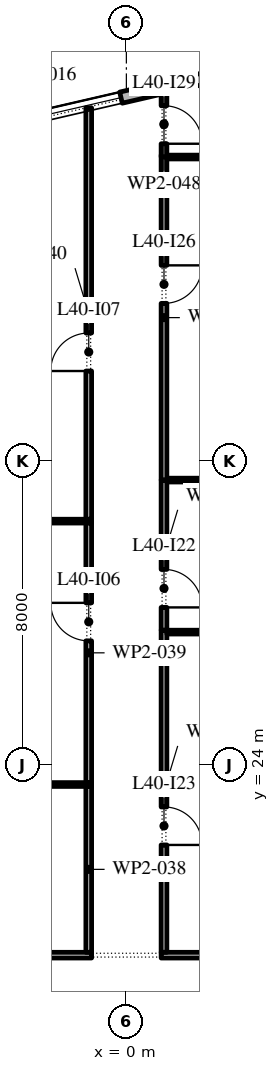
"""IFC4 building model, lengths in metres.
Left out: names, types, materials, properties, quantities, classifications, styles, units other than length and angle.
Written with IfcOpenShell. Run it as: python <this file> out.ifc"""

import sys

from ifc_helpers import new_model, si_unit, direction, frame, frame_2d, origin, place, context, subcontext, project, spatial, rectangle, extrude, element, fill, save


model = new_model("IFC4")
c1 = context("Model", 3, precision=1e-05, world=origin(), true_north=direction((0.0, 1.0)))
c2 = subcontext(c1, "Body", "Model", "MODEL_VIEW")
j1 = project(units=[si_unit("LENGTHUNIT", "METRE"), si_unit("PLANEANGLEUNIT", "RADIAN")], contexts=[c1])
p1 = place(None, origin())
s1 = spatial("IfcSite", under=j1, at=p1, CompositionType="ELEMENT")
p2 = place(p1, origin())
s2 = spatial("IfcBuilding", under=s1, at=p2, CompositionType="ELEMENT")
p3 = place(p2, frame((0.0, 0.0, 184.2)))
s3 = spatial("IfcBuildingStorey", under=s2, at=p3, CompositionType="ELEMENT", Elevation=184.2)
p4 = place(p3, frame((17.592, 45.657, 0.0), z_axis=(0.0, 0.0, 1.0), x_axis=(-0.974370243697, -0.224950279389, 0.0)))
e1 = element("IfcWall", 1, at=p4, inside=s3, PredefinedType="STANDARD", context=c2, shape_type="SweptSolid", body=[
    extrude(rectangle(XDim=49.5, YDim=0.3, at=frame_2d((24.75, 0.0))), origin(), (0.0, 0.0, 1.0), 4.0),
])
p5 = place(p4, frame((2.8, 0.0, 0.0)))
e2 = element("IfcOpeningElement", 2, at=p5, cuts=e1, PredefinedType="OPENING", context=c2, shape_type="SweptSolid", body=[
    extrude(rectangle(XDim=2.4, YDim=3.5, at=frame_2d((1.2, 1.75))), frame((0.0, 0.16, 0.0), z_axis=(0.0, -1.0, 0.0), x_axis=(1.0, 0.0, 0.0)), (0.0, 0.0, 1.0), 0.32),
])
p6 = place(p4, frame((9.9, 0.0, 0.45)))
e3 = element("IfcOpeningElement", 3, at=p6, cuts=e1, PredefinedType="OPENING", context=c2, shape_type="SweptSolid", body=[
    extrude(rectangle(XDim=4.5, YDim=2.45, at=frame_2d((2.25, 1.225))), frame((0.0, 0.16, 0.0), z_axis=(0.0, -1.0, 0.0), x_axis=(1.0, 0.0, 0.0)), (0.0, 0.0, 1.0), 0.32),
])
p7 = place(p4, frame((18.2, 0.0, 0.45)))
e4 = element("IfcOpeningElement", 4, at=p7, cuts=e1, PredefinedType="OPENING", context=c2, shape_type="SweptSolid", body=[
    extrude(rectangle(XDim=4.5, YDim=2.45, at=frame_2d((2.25, 1.225))), frame((0.0, 0.16, 0.0), z_axis=(0.0, -1.0, 0.0), x_axis=(1.0, 0.0, 0.0)), (0.0, 0.0, 1.0), 0.32),
])
p8 = place(p4, frame((26.5, 0.0, 0.45)))
e5 = element("IfcOpeningElement", 5, at=p8, cuts=e1, PredefinedType="OPENING", context=c2, shape_type="SweptSolid", body=[
    extrude(rectangle(XDim=4.5, YDim=2.525, at=frame_2d((2.25, 1.262))), frame((0.0, 0.16, 0.0), z_axis=(0.0, -1.0, 0.0), x_axis=(1.0, 0.0, 0.0)), (0.0, 0.0, 1.0), 0.32),
])
p9 = place(p4, frame((35.85, 0.0, 0.0)))
e6 = element("IfcOpeningElement", 6, at=p9, cuts=e1, PredefinedType="OPENING", context=c2, shape_type="SweptSolid", body=[
    extrude(rectangle(XDim=2.4, YDim=3.5, at=frame_2d((1.2, 1.75))), frame((0.0, 0.16, 0.0), z_axis=(0.0, -1.0, 0.0), x_axis=(1.0, 0.0, 0.0)), (0.0, 0.0, 1.0), 0.32),
])
p10 = place(p4, frame((43.1, 0.0, 0.45)))
e7 = element("IfcOpeningElement", 7, at=p10, cuts=e1, PredefinedType="OPENING", context=c2, shape_type="SweptSolid", body=[
    extrude(rectangle(XDim=4.5, YDim=2.675, at=frame_2d((2.25, 1.337))), frame((0.0, 0.16, 0.0), z_axis=(0.0, -1.0, 0.0), x_axis=(1.0, 0.0, 0.0)), (0.0, 0.0, 1.0), 0.32),
])
p11 = place(p3, frame((-8.275, 19.0, 0.0), z_axis=(0.0, 0.0, 1.0), x_axis=(1.0, 0.0, 0.0)))
e8 = element("IfcWall", 8, at=p11, inside=s3, PredefinedType="PARTITIONING", context=c2, shape_type="SweptSolid", body=[
    extrude(rectangle(XDim=7.36, YDim=0.15, at=frame_2d((3.68, 0.0))), origin(), (0.0, 0.0, 1.0), 4.0),
])
p12 = place(p11, frame((4.635, 0.0, 0.0)))
e9 = element("IfcOpeningElement", 9, at=p12, cuts=e8, PredefinedType="OPENING", context=c2, shape_type="SweptSolid", body=[
    extrude(rectangle(XDim=1.0, YDim=2.1, at=frame_2d((0.5, 1.05))), frame((0.0, 0.085, 0.0), z_axis=(0.0, -1.0, 0.0), x_axis=(1.0, 0.0, 0.0)), (0.0, 0.0, 1.0), 0.17),
])
p13 = place(p3, frame((-6.425, 23.49, 0.0), z_axis=(0.0, 0.0, 1.0), x_axis=(1.0, 0.0, 0.0)))
e10 = element("IfcWall", 10, at=p13, inside=s3, PredefinedType="PARTITIONING", context=c2, shape_type="SweptSolid", body=[
    extrude(rectangle(XDim=5.51, YDim=0.1, at=frame_2d((2.755, 0.0))), origin(), (0.0, 0.0, 1.0), 4.0),
])
p14 = place(p3, frame((-6.5, 30.42, 0.0), z_axis=(0.0, 0.0, 1.0), x_axis=(1.0, 0.0, 0.0)))
e11 = element("IfcWall", 11, at=p14, inside=s3, PredefinedType="PARTITIONING", context=c2, shape_type="SweptSolid", body=[
    extrude(rectangle(XDim=5.585, YDim=0.1, at=frame_2d((2.792, 0.0))), origin(), (0.0, 0.0, 1.0), 4.0),
])
p15 = place(p3, frame((-0.99, 19.075, 0.0), z_axis=(0.0, 0.0, 1.0), x_axis=(0.0, 1.0, 0.0)))
e12 = element("IfcWall", 12, at=p15, inside=s3, PredefinedType="PARTITIONING", context=c2, shape_type="SweptSolid", body=[
    extrude(rectangle(XDim=4.365, YDim=0.15, at=frame_2d((2.183, 0.0))), origin(), (0.0, 0.0, 1.0), 4.0),
])
p16 = place(p3, frame((-0.99, 23.54, 0.0), z_axis=(0.0, 0.0, 1.0), x_axis=(0.0, 1.0, 0.0)))
e13 = element("IfcWall", 13, at=p16, inside=s3, PredefinedType="PARTITIONING", context=c2, shape_type="SweptSolid", body=[
    extrude(rectangle(XDim=6.83, YDim=0.15, at=frame_2d((3.415, 0.0))), origin(), (0.0, 0.0, 1.0), 4.0),
])
p17 = place(p16, frame((3.73, 0.0, 0.0)))
e14 = element("IfcOpeningElement", 14, at=p17, cuts=e13, PredefinedType="OPENING", context=c2, shape_type="SweptSolid", body=[
    extrude(rectangle(XDim=1.0, YDim=2.1, at=frame_2d((0.5, 1.05))), frame((0.0, 0.085, 0.0), z_axis=(0.0, -1.0, 0.0), x_axis=(1.0, 0.0, 0.0)), (0.0, 0.0, 1.0), 0.17),
])
p18 = place(p3, frame((-0.99, 30.47, 0.0), z_axis=(0.0, 0.0, 1.0), x_axis=(0.0, 1.0, 0.0)))
e15 = element("IfcWall", 15, at=p18, inside=s3, PredefinedType="PARTITIONING", context=c2, shape_type="SweptSolid", body=[
    extrude(rectangle(XDim=10.826, YDim=0.15, at=frame_2d((5.413, 0.0))), origin(), (0.0, 0.0, 1.0), 4.0),
])
p19 = place(p18, frame((3.9, 0.0, 0.0)))
e16 = element("IfcOpeningElement", 16, at=p19, cuts=e15, PredefinedType="OPENING", context=c2, shape_type="SweptSolid", body=[
    extrude(rectangle(XDim=1.0, YDim=2.1, at=frame_2d((0.5, 1.05))), frame((0.0, 0.085, 0.0), z_axis=(0.0, -1.0, 0.0), x_axis=(1.0, 0.0, 0.0)), (0.0, 0.0, 1.0), 0.17),
])
p20 = place(p3, frame((0.915, 19.0, 0.0), z_axis=(0.0, 0.0, 1.0), x_axis=(1.0, 0.0, 0.0)))
e17 = element("IfcWall", 17, at=p20, inside=s3, PredefinedType="PARTITIONING", context=c2, shape_type="SweptSolid", body=[
    extrude(rectangle(XDim=7.35, YDim=0.15, at=frame_2d((3.675, 0.0))), origin(), (0.0, 0.0, 1.0), 4.0),
])
p21 = place(p3, frame((0.99, 27.55, 0.0), z_axis=(0.0, 0.0, 1.0), x_axis=(0.0, -1.0, 0.0)))
e18 = element("IfcWall", 18, at=p21, inside=s3, PredefinedType="PARTITIONING", context=c2, shape_type="SweptSolid", body=[
    extrude(rectangle(XDim=8.475, YDim=0.15, at=frame_2d((4.238, 0.0))), origin(), (0.0, 0.0, 1.0), 4.0),
])
p22 = place(p21, frame((4.65, 0.0, 0.0)))
e19 = element("IfcOpeningElement", 19, at=p22, cuts=e18, PredefinedType="OPENING", context=c2, shape_type="SweptSolid", body=[
    extrude(rectangle(XDim=1.0, YDim=2.1, at=frame_2d((0.5, 1.05))), frame((0.0, 0.085, 0.0), z_axis=(0.0, -1.0, 0.0), x_axis=(1.0, 0.0, 0.0)), (0.0, 0.0, 1.0), 0.17),
])
p23 = place(p3, frame((0.99, 31.5, 0.0), z_axis=(0.0, 0.0, 1.0), x_axis=(0.0, -1.0, 0.0)))
e20 = element("IfcWall", 20, at=p23, inside=s3, PredefinedType="PARTITIONING", context=c2, shape_type="SweptSolid", body=[
    extrude(rectangle(XDim=3.95, YDim=0.15, at=frame_2d((1.975, 0.0))), origin(), (0.0, 0.0, 1.0), 4.0),
])
p24 = place(p23, frame((2.35, 0.0, 0.0)))
e21 = element("IfcOpeningElement", 21, at=p24, cuts=e20, PredefinedType="OPENING", context=c2, shape_type="SweptSolid", body=[
    extrude(rectangle(XDim=1.0, YDim=2.1, at=frame_2d((0.5, 1.05))), frame((0.0, 0.085, 0.0), z_axis=(0.0, -1.0, 0.0), x_axis=(1.0, 0.0, 0.0)), (0.0, 0.0, 1.0), 0.17),
])
p25 = place(p3, frame((1.065, 31.5, 0.0), z_axis=(0.0, 0.0, 1.0), x_axis=(1.0, 0.0, 0.0)))
e22 = element("IfcWall", 22, at=p25, inside=s3, PredefinedType="PARTITIONING", context=c2, shape_type="SweptSolid", body=[
    extrude(rectangle(XDim=6.485, YDim=0.1, at=frame_2d((3.243, 0.0))), origin(), (0.0, 0.0, 1.0), 4.0),
])
p26 = place(p3, frame((0.99, 40.05, 0.0), z_axis=(0.0, 0.0, 1.0), x_axis=(0.0, -1.0, 0.0)))
e23 = element("IfcWall", 23, at=p26, inside=s3, PredefinedType="PARTITIONING", context=c2, shape_type="SweptSolid", body=[
    extrude(rectangle(XDim=8.55, YDim=0.15, at=frame_2d((4.275, 0.0))), origin(), (0.0, 0.0, 1.0), 4.0),
])
p27 = place(p26, frame((2.9, 0.0, 0.0)))
e24 = element("IfcOpeningElement", 24, at=p27, cuts=e23, PredefinedType="OPENING", context=c2, shape_type="SweptSolid", body=[
    extrude(rectangle(XDim=1.0, YDim=2.1, at=frame_2d((0.5, 1.05))), frame((0.0, 0.085, 0.0), z_axis=(0.0, -1.0, 0.0), x_axis=(1.0, 0.0, 0.0)), (0.0, 0.0, 1.0), 0.17),
])
p28 = place(p3, frame((1.065, 40.0, 0.0), z_axis=(0.0, 0.0, 1.0), x_axis=(1.0, 0.0, 0.0)))
e25 = element("IfcWall", 25, at=p28, inside=s3, PredefinedType="PARTITIONING", context=c2, shape_type="SweptSolid", body=[
    extrude(rectangle(XDim=8.815, YDim=0.1, at=frame_2d((4.407, 0.0))), origin(), (0.0, 0.0, 1.0), 4.0),
])
p29 = place(p3, frame((0.99, 41.753, 0.0), z_axis=(0.0, 0.0, 1.0), x_axis=(0.0, -1.0, 0.0)))
e26 = element("IfcWall", 26, at=p29, inside=s3, PredefinedType="PARTITIONING", context=c2, shape_type="SweptSolid", body=[
    extrude(rectangle(XDim=1.753, YDim=0.15, at=frame_2d((0.876, 0.0))), origin(), (0.0, 0.0, 1.0), 4.0),
])
p30 = place(p29, frame((0.403, 0.0, 0.0)))
e27 = element("IfcOpeningElement", 27, at=p30, cuts=e26, PredefinedType="OPENING", context=c2, shape_type="SweptSolid", body=[
    extrude(rectangle(XDim=1.0, YDim=2.1, at=frame_2d((0.5, 1.05))), frame((0.0, 0.085, 0.0), z_axis=(0.0, -1.0, 0.0), x_axis=(1.0, 0.0, 0.0)), (0.0, 0.0, 1.0), 0.17),
])
p31 = place(p3, frame((7.55, 27.5, 0.0), z_axis=(0.0, 0.0, 1.0), x_axis=(-1.0, 0.0, 0.0)))
e28 = element("IfcWall", 28, at=p31, inside=s3, PredefinedType="PARTITIONING", context=c2, shape_type="SweptSolid", body=[
    extrude(rectangle(XDim=6.485, YDim=0.1, at=frame_2d((3.243, 0.0))), origin(), (0.0, 0.0, 1.0), 4.0),
])
p32 = place(p7, origin())
e29 = element("IfcWindow", 29, at=p32, inside=s3, PartitioningType="DOUBLE_PANEL_VERTICAL", PredefinedType="WINDOW", context=c2, shape_type="SweptSolid", body=[
    extrude(rectangle(XDim=4.5, YDim=2.45, at=frame_2d((2.25, 1.225))), frame((0.0, 0.03, 0.0), z_axis=(0.0, -1.0, 0.0), x_axis=(1.0, 0.0, 0.0)), (0.0, 0.0, 1.0), 0.06),
])
fill(e4, e29)
p33 = place(p17, origin())
e30 = element("IfcDoor", 30, at=p33, inside=s3, OperationType="SINGLE_SWING_LEFT", PredefinedType="DOOR", context=c2, shape_type="SweptSolid", body=[
    extrude(rectangle(XDim=1.0, YDim=2.1, at=frame_2d((0.5, 1.05))), frame((0.0, 0.025, 0.0), z_axis=(0.0, -1.0, 0.0), x_axis=(1.0, 0.0, 0.0)), (0.0, 0.0, 1.0), 0.05),
])
fill(e14, e30)
p34 = place(p19, origin())
e31 = element("IfcDoor", 31, at=p34, inside=s3, OperationType="SINGLE_SWING_RIGHT", PredefinedType="DOOR", context=c2, shape_type="SweptSolid", body=[
    extrude(rectangle(XDim=1.0, YDim=2.1, at=frame_2d((0.5, 1.05))), frame((0.0, 0.025, 0.0), z_axis=(0.0, -1.0, 0.0), x_axis=(1.0, 0.0, 0.0)), (0.0, 0.0, 1.0), 0.05),
])
fill(e16, e31)
p35 = place(p24, origin())
e32 = element("IfcDoor", 32, at=p35, inside=s3, OperationType="SINGLE_SWING_LEFT", PredefinedType="DOOR", context=c2, shape_type="SweptSolid", body=[
    extrude(rectangle(XDim=1.0, YDim=2.1, at=frame_2d((0.5, 1.05))), frame((0.0, 0.025, 0.0), z_axis=(0.0, -1.0, 0.0), x_axis=(1.0, 0.0, 0.0)), (0.0, 0.0, 1.0), 0.05),
])
fill(e21, e32)
p36 = place(p22, origin())
e33 = element("IfcDoor", 33, at=p36, inside=s3, OperationType="SINGLE_SWING_LEFT", PredefinedType="DOOR", context=c2, shape_type="SweptSolid", body=[
    extrude(rectangle(XDim=1.0, YDim=2.1, at=frame_2d((0.5, 1.05))), frame((0.0, 0.025, 0.0), z_axis=(0.0, -1.0, 0.0), x_axis=(1.0, 0.0, 0.0)), (0.0, 0.0, 1.0), 0.05),
])
fill(e19, e33)
p37 = place(p27, origin())
e34 = element("IfcDoor", 34, at=p37, inside=s3, OperationType="SINGLE_SWING_RIGHT", PredefinedType="DOOR", context=c2, shape_type="SweptSolid", body=[
    extrude(rectangle(XDim=1.0, YDim=2.1, at=frame_2d((0.5, 1.05))), frame((0.0, 0.025, 0.0), z_axis=(0.0, -1.0, 0.0), x_axis=(1.0, 0.0, 0.0)), (0.0, 0.0, 1.0), 0.05),
])
fill(e24, e34)
p38 = place(p30, origin())
e35 = element("IfcDoor", 35, at=p38, inside=s3, OperationType="SINGLE_SWING_LEFT", PredefinedType="DOOR", context=c2, shape_type="SweptSolid", body=[
    extrude(rectangle(XDim=1.0, YDim=2.1, at=frame_2d((0.5, 1.05))), frame((0.0, 0.025, 0.0), z_axis=(0.0, -1.0, 0.0), x_axis=(1.0, 0.0, 0.0)), (0.0, 0.0, 1.0), 0.05),
])
fill(e27, e35)
save(model, sys.argv[1])
